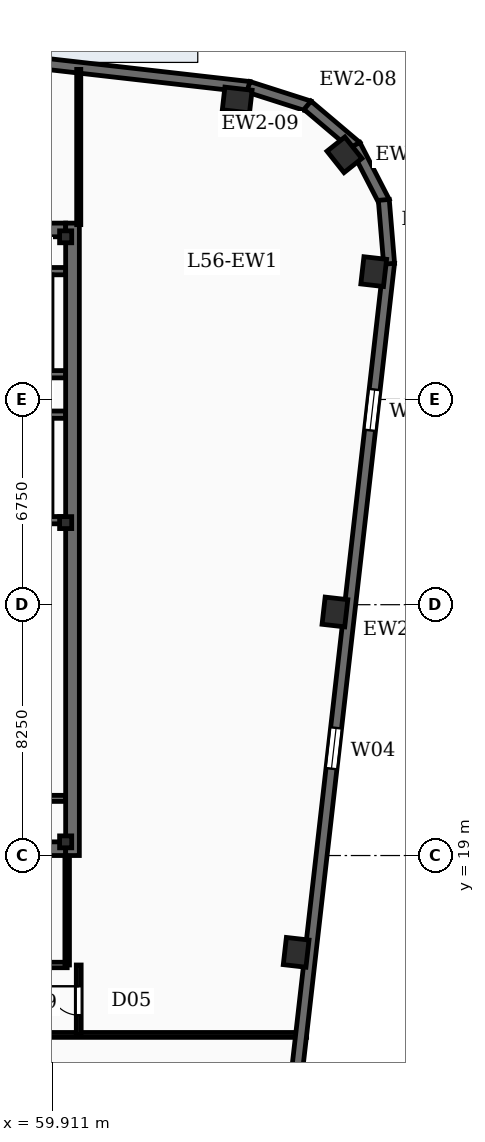
"""IFC4 building model, lengths in metres.
Left out: names, types, materials, properties, quantities, classifications, styles, units other than length and angle.
Written with IfcOpenShell. Run it as: python <this file> out.ifc"""

import sys

from ifc_helpers import new_model, si_unit, direction, frame, frame_2d, origin, origin_2d, place, context, subcontext, project, spatial, rectangle, i_section, extrude, element, fill, save


model = new_model("IFC4")
c1 = context("Model", 3, precision=1e-05, world=origin(), true_north=direction((0.0, 1.0)))
c2 = subcontext(c1, "Body", "Model", "MODEL_VIEW")
j1 = project(units=[si_unit("LENGTHUNIT", "METRE"), si_unit("PLANEANGLEUNIT", "RADIAN")], contexts=[c1])
p1 = place(None, origin())
s1 = spatial("IfcSite", under=j1, at=p1, CompositionType="ELEMENT")
p2 = place(p1, origin())
s2 = spatial("IfcBuilding", under=s1, at=p2, CompositionType="ELEMENT")
p3 = place(p2, frame((0.0, 0.0, 232.2)))
s3 = spatial("IfcBuildingStorey", under=s2, at=p3, CompositionType="ELEMENT", Elevation=232.2)
p4 = place(p3, frame((60.575, 19.0, -0.27), z_axis=(0.0, 0.0, 1.0), x_axis=(0.0, 1.0, 0.0)))
e1 = element("IfcWall", 1, at=p4, inside=s3, PredefinedType="SHEAR", context=c2, shape_type="SweptSolid", body=[
    extrude(rectangle(XDim=20.8, YDim=0.45, at=frame_2d((10.4, 0.0))), origin(), (0.0, 0.0, 1.0), 3.75),
])
for number, where, z_axis, x_axis in (
    (2, (50.55, 19.225, -0.27), (0.0, 0.0, 1.0), (1.0, 0.0, 0.0)),
    (3, (50.55, 39.575, -0.27), (0.0, 0.0, 1.0), (1.0, 0.0, 0.0)),
):
    element("IfcWall", number, at=place(p3, frame(where, z_axis=z_axis, x_axis=x_axis)), inside=s3, PredefinedType="SHEAR", context=c2, shape_type="SweptSolid", body=[
        extrude(rectangle(XDim=9.8, YDim=0.45, at=frame_2d((4.9, 0.0))), origin(), (0.0, 0.0, 1.0), 3.75),
    ])
for number, where, z_axis, x_axis in (
    (4, (60.35, 19.45, -0.27), (0.0, 0.0, 1.0), (1.0, 0.0, 0.0)),
    (5, (60.35, 29.95, -0.27), (0.0, 0.0, 1.0), (1.0, 0.0, 0.0)),
    (6, (60.35, 39.35, -0.27), (0.0, 0.0, 1.0), (1.0, 0.0, 0.0)),
):
    element("IfcColumn", number, at=place(p3, frame(where, z_axis=z_axis, x_axis=x_axis)), inside=s3, PredefinedType="COLUMN", context=c2, shape_type="SweptSolid", body=[
        extrude(i_section(OverallWidth=0.399, OverallDepth=0.393, WebThickness=0.023, FlangeThickness=0.037, FilletRadius=0.02, at=origin_2d()), origin(), (0.0, 0.0, 1.0), 3.75),
    ])
for number, where, z_axis, x_axis in (
    (7, (67.931, 15.816, -0.27), (0.0, 0.0, 1.0), (0.113, 0.994, 0.0)),
    (8, (69.207, 27.01, -0.27), (0.0, 0.0, 1.0), (0.113, 0.994, 0.0)),
    (9, (70.482, 38.205, -0.27), (0.0, 0.0, 1.0), (0.113, 0.994, 0.0)),
    (10, (69.52, 42.047, -0.27), (0.0, 0.0, 1.0), (-0.623, 0.783, 0.0)),
    (11, (65.992, 43.849, -0.27), (0.0, 0.0, 1.0), (0.994, -0.113, 0.0)),
):
    element("IfcColumn", number, at=place(p3, frame(where, z_axis=z_axis, x_axis=x_axis)), inside=s3, PredefinedType="COLUMN", context=c2, shape_type="SweptSolid", body=[
        extrude(rectangle(XDim=0.9, YDim=0.75, at=origin_2d()), origin(), (0.0, 0.0, 1.0), 3.75),
    ])
p5 = place(p3, frame((70.989, 38.499, 0.0), z_axis=(0.0, 0.0, 1.0), x_axis=(-0.113203107947, -0.993571867733, 0.0)))
e12 = element("IfcWall", 12, at=p5, inside=s3, PredefinedType="SOLIDWALL", context=c2, shape_type="SweptSolid", body=[
    extrude(rectangle(XDim=34.5, YDim=0.36, at=frame_2d((17.25, 0.0))), origin(), (0.0, 0.0, 1.0), 3.48),
])
p6 = place(p5, frame((4.2, 0.0, 0.88)))
e13 = element("IfcOpeningElement", 13, at=p6, cuts=e12, PredefinedType="OPENING", context=c2, shape_type="SweptSolid", body=[
    extrude(rectangle(XDim=1.35, YDim=2.2, at=frame_2d((0.675, 1.1))), frame((0.0, 0.19, 0.0), z_axis=(0.0, -1.0, 0.0), x_axis=(1.0, 0.0, 0.0)), (0.0, 0.0, 1.0), 0.38),
])
p7 = place(p5, frame((15.4, 0.0, 0.88)))
e14 = element("IfcOpeningElement", 14, at=p7, cuts=e12, PredefinedType="OPENING", context=c2, shape_type="SweptSolid", body=[
    extrude(rectangle(XDim=1.35, YDim=2.2, at=frame_2d((0.675, 1.1))), frame((0.0, 0.19, 0.0), z_axis=(0.0, -1.0, 0.0), x_axis=(1.0, 0.0, 0.0)), (0.0, 0.0, 1.0), 0.38),
])
p8 = place(p5, frame((26.6, 0.0, 0.88)))
e15 = element("IfcOpeningElement", 15, at=p8, cuts=e12, PredefinedType="OPENING", context=c2, shape_type="SweptSolid", body=[
    extrude(rectangle(XDim=1.35, YDim=2.2, at=frame_2d((0.675, 1.1))), frame((0.0, 0.19, 0.0), z_axis=(0.0, -1.0, 0.0), x_axis=(1.0, 0.0, 0.0)), (0.0, 0.0, 1.0), 0.38),
])
p9 = place(p3, frame((70.814, 40.564, 0.0), z_axis=(0.0, 0.0, 1.0), x_axis=(0.082853678144, -0.996561723135, 0.0)))
e16 = element("IfcWall", 16, at=p9, inside=s3, PredefinedType="SOLIDWALL", context=c2, shape_type="SweptSolid", body=[
    extrude(rectangle(XDim=2.107, YDim=0.36, at=frame_2d((1.053, 0.0))), origin(), (0.0, 0.0, 1.0), 3.48),
])
for number, where, z_axis, x_axis in (
    (17, (69.868, 42.369, 0.0), (0.0, 0.0, 1.0), (0.458, -0.889, 0.0)),
    (18, (68.304, 43.676, 0.0), (0.0, 0.0, 1.0), (0.763, -0.646, 0.0)),
    (19, (66.359, 44.284, 0.0), (0.0, 0.0, 1.0), (0.952, -0.305, 0.0)),
):
    element("IfcWall", number, at=place(p3, frame(where, z_axis=z_axis, x_axis=x_axis)), inside=s3, PredefinedType="SOLIDWALL", context=c2, shape_type="SweptSolid", body=[
        extrude(rectangle(XDim=2.107, YDim=0.36, at=frame_2d((1.054, 0.0))), origin(), (0.0, 0.0, 1.0), 3.48),
    ])
p10 = place(p3, frame((19.894, 49.575, 0.0), z_axis=(0.0, 0.0, 1.0), x_axis=(0.993571439016, -0.113206870688, 0.0)))
e20 = element("IfcWall", 20, at=p10, inside=s3, PredefinedType="SOLIDWALL", context=c2, shape_type="SweptSolid", body=[
    extrude(rectangle(XDim=46.8, YDim=0.36, at=frame_2d((23.4, 0.0))), origin(), (0.0, 0.0, 1.0), 3.48),
])
p11 = place(p10, frame((2.6, 0.0, 0.88)))
e21 = element("IfcOpeningElement", 21, at=p11, cuts=e20, PredefinedType="OPENING", context=c2, shape_type="SweptSolid", body=[
    extrude(rectangle(XDim=1.5, YDim=2.05, at=frame_2d((0.75, 1.025))), frame((0.0, 0.19, 0.0), z_axis=(0.0, -1.0, 0.0), x_axis=(1.0, 0.0, 0.0)), (0.0, 0.0, 1.0), 0.38),
])
p12 = place(p10, frame((29.6, 0.0, 0.88)))
e22 = element("IfcOpeningElement", 22, at=p12, cuts=e20, PredefinedType="OPENING", context=c2, shape_type="SweptSolid", body=[
    extrude(rectangle(XDim=1.5, YDim=2.05, at=frame_2d((0.75, 1.025))), frame((0.0, 0.19, 0.0), z_axis=(0.0, -1.0, 0.0), x_axis=(1.0, 0.0, 0.0)), (0.0, 0.0, 1.0), 0.38),
])
p13 = place(p3, frame((60.35, 30.03, 0.0), z_axis=(0.0, 0.0, 1.0), x_axis=(-1.0, 0.0, 0.0)))
e23 = element("IfcWall", 23, at=p13, inside=s3, PredefinedType="SOLIDWALL", context=c2, shape_type="SweptSolid", body=[
    extrude(rectangle(XDim=9.8, YDim=0.24, at=frame_2d((4.9, 0.0))), origin(), (0.0, 0.0, 1.0), 3.48),
])
p14 = place(p13, frame((7.83, 0.0, 0.0)))
e24 = element("IfcOpeningElement", 24, at=p14, cuts=e23, PredefinedType="OPENING", context=c2, shape_type="SweptSolid", body=[
    extrude(rectangle(XDim=1.1, YDim=2.15, at=frame_2d((0.55, 1.075))), frame((0.0, 0.13, 0.0), z_axis=(0.0, -1.0, 0.0), x_axis=(1.0, 0.0, 0.0)), (0.0, 0.0, 1.0), 0.26),
])
p15 = place(p3, frame((50.55, 33.5, 0.0), z_axis=(0.0, 0.0, 1.0), x_axis=(1.0, 0.0, 0.0)))
e25 = element("IfcWall", 25, at=p15, inside=s3, PredefinedType="SOLIDWALL", context=c2, shape_type="SweptSolid", body=[
    extrude(rectangle(XDim=9.8, YDim=0.24, at=frame_2d((4.9, 0.0))), origin(), (0.0, 0.0, 1.0), 3.48),
])
p16 = place(p3, frame((59.78, 30.15, 0.0), z_axis=(0.0, 0.0, 1.0), x_axis=(0.0, 1.0, 0.0)))
e26 = element("IfcWall", 26, at=p16, inside=s3, PredefinedType="SOLIDWALL", context=c2, shape_type="SweptSolid", body=[
    extrude(rectangle(XDim=3.23, YDim=0.24, at=frame_2d((1.615, 0.0))), origin(), (0.0, 0.0, 1.0), 3.48),
])
p17 = place(p3, frame((60.35, 34.83, 0.0), z_axis=(0.0, 0.0, 1.0), x_axis=(-1.0, 0.0, 0.0)))
e27 = element("IfcWall", 27, at=p17, inside=s3, PredefinedType="SOLIDWALL", context=c2, shape_type="SweptSolid", body=[
    extrude(rectangle(XDim=9.8, YDim=0.24, at=frame_2d((4.9, 0.0))), origin(), (0.0, 0.0, 1.0), 3.48),
])
p18 = place(p17, frame((7.87, 0.0, 0.0)))
e28 = element("IfcOpeningElement", 28, at=p18, cuts=e27, PredefinedType="OPENING", context=c2, shape_type="SweptSolid", body=[
    extrude(rectangle(XDim=1.1, YDim=2.15, at=frame_2d((0.55, 1.075))), frame((0.0, 0.13, 0.0), z_axis=(0.0, -1.0, 0.0), x_axis=(1.0, 0.0, 0.0)), (0.0, 0.0, 1.0), 0.26),
])
p19 = place(p3, frame((50.55, 38.22, 0.0), z_axis=(0.0, 0.0, 1.0), x_axis=(1.0, 0.0, 0.0)))
e29 = element("IfcWall", 29, at=p19, inside=s3, PredefinedType="SOLIDWALL", context=c2, shape_type="SweptSolid", body=[
    extrude(rectangle(XDim=9.8, YDim=0.24, at=frame_2d((4.9, 0.0))), origin(), (0.0, 0.0, 1.0), 3.48),
])
p20 = place(p3, frame((59.78, 34.95, 0.0), z_axis=(0.0, 0.0, 1.0), x_axis=(0.0, 1.0, 0.0)))
e30 = element("IfcWall", 30, at=p20, inside=s3, PredefinedType="SOLIDWALL", context=c2, shape_type="SweptSolid", body=[
    extrude(rectangle(XDim=3.15, YDim=0.24, at=frame_2d((1.575, 0.0))), origin(), (0.0, 0.0, 1.0), 3.48),
])
p21 = place(p3, frame((50.55, 20.88, 0.0), z_axis=(0.0, 0.0, 1.0), x_axis=(1.0, 0.0, 0.0)))
e31 = element("IfcWall", 31, at=p21, inside=s3, PredefinedType="SOLIDWALL", context=c2, shape_type="SweptSolid", body=[
    extrude(rectangle(XDim=9.8, YDim=0.2, at=frame_2d((4.9, 0.0))), origin(), (0.0, 0.0, 1.0), 2.54),
])
p22 = place(p21, frame((1.4, 0.0, 0.0)))
e32 = element("IfcOpeningElement", 32, at=p22, cuts=e31, PredefinedType="OPENING", context=c2, shape_type="SweptSolid", body=[
    extrude(rectangle(XDim=1.05, YDim=2.15, at=frame_2d((0.525, 1.075))), frame((0.0, 0.11, 0.0), z_axis=(0.0, -1.0, 0.0), x_axis=(1.0, 0.0, 0.0)), (0.0, 0.0, 1.0), 0.22),
])
p23 = place(p21, frame((5.5, 0.0, 0.0)))
e33 = element("IfcOpeningElement", 33, at=p23, cuts=e31, PredefinedType="OPENING", context=c2, shape_type="SweptSolid", body=[
    extrude(rectangle(XDim=1.05, YDim=2.15, at=frame_2d((0.525, 1.075))), frame((0.0, 0.11, 0.0), z_axis=(0.0, -1.0, 0.0), x_axis=(1.0, 0.0, 0.0)), (0.0, 0.0, 1.0), 0.22),
])
p24 = place(p3, frame((50.4, 15.4, 0.0), z_axis=(0.0, 0.0, 1.0), x_axis=(1.0, 0.0, 0.0)))
e34 = element("IfcWall", 34, at=p24, inside=s3, PredefinedType="SOLIDWALL", context=c2, shape_type="SweptSolid", body=[
    extrude(rectangle(XDim=10.0, YDim=0.18, at=frame_2d((5.0, 0.0))), origin(), (0.0, 0.0, 1.0), 2.54),
])
p25 = place(p24, frame((0.54, 0.0, 0.0)))
e35 = element("IfcOpeningElement", 35, at=p25, cuts=e34, PredefinedType="OPENING", context=c2, shape_type="SweptSolid", body=[
    extrude(rectangle(XDim=0.92, YDim=2.1, at=frame_2d((0.46, 1.05))), frame((0.0, 0.1, 0.0), z_axis=(0.0, -1.0, 0.0), x_axis=(1.0, 0.0, 0.0)), (0.0, 0.0, 1.0), 0.2),
])
p26 = place(p24, frame((2.54, 0.0, 0.0)))
e36 = element("IfcOpeningElement", 36, at=p26, cuts=e34, PredefinedType="OPENING", context=c2, shape_type="SweptSolid", body=[
    extrude(rectangle(XDim=0.92, YDim=2.1, at=frame_2d((0.46, 1.05))), frame((0.0, 0.1, 0.0), z_axis=(0.0, -1.0, 0.0), x_axis=(1.0, 0.0, 0.0)), (0.0, 0.0, 1.0), 0.2),
])
p27 = place(p24, frame((4.54, 0.0, 0.0)))
e37 = element("IfcOpeningElement", 37, at=p27, cuts=e34, PredefinedType="OPENING", context=c2, shape_type="SweptSolid", body=[
    extrude(rectangle(XDim=0.92, YDim=2.1, at=frame_2d((0.46, 1.05))), frame((0.0, 0.1, 0.0), z_axis=(0.0, -1.0, 0.0), x_axis=(1.0, 0.0, 0.0)), (0.0, 0.0, 1.0), 0.2),
])
p28 = place(p24, frame((6.54, 0.0, 0.0)))
e38 = element("IfcOpeningElement", 38, at=p28, cuts=e34, PredefinedType="OPENING", context=c2, shape_type="SweptSolid", body=[
    extrude(rectangle(XDim=0.92, YDim=2.1, at=frame_2d((0.46, 1.05))), frame((0.0, 0.1, 0.0), z_axis=(0.0, -1.0, 0.0), x_axis=(1.0, 0.0, 0.0)), (0.0, 0.0, 1.0), 0.2),
])
p29 = place(p24, frame((8.57, 0.0, 0.0)))
e39 = element("IfcOpeningElement", 39, at=p29, cuts=e34, PredefinedType="OPENING", context=c2, shape_type="SweptSolid", body=[
    extrude(rectangle(XDim=0.86, YDim=2.05, at=frame_2d((0.43, 1.025))), frame((0.0, 0.1, 0.0), z_axis=(0.0, -1.0, 0.0), x_axis=(1.0, 0.0, 0.0)), (0.0, 0.0, 1.0), 0.2),
])
p30 = place(p3, frame((60.4, 15.4, 0.0), z_axis=(0.0, 0.0, 1.0), x_axis=(0.0, 1.0, 0.0)))
e40 = element("IfcWall", 40, at=p30, inside=s3, PredefinedType="PARTITIONING", context=c2, shape_type="SweptSolid", body=[
    extrude(rectangle(XDim=3.58, YDim=0.15, at=frame_2d((1.79, 0.0))), origin(), (0.0, 0.0, 1.0), 2.54),
])
p31 = place(p3, frame((10.303, 13.1, 0.0), z_axis=(0.0, 0.0, 1.0), x_axis=(1.0, 0.0, 0.0)))
e41 = element("IfcWall", 41, at=p31, inside=s3, PredefinedType="PARTITIONING", context=c2, shape_type="SweptSolid", body=[
    extrude(rectangle(XDim=57.973, YDim=0.16, at=frame_2d((28.986, 0.0))), origin(), (0.0, 0.0, 1.0), 2.54),
])
p32 = place(p31, frame((8.922, 0.0, 0.0)))
e42 = element("IfcOpeningElement", 42, at=p32, cuts=e41, PredefinedType="OPENING", context=c2, shape_type="SweptSolid", body=[
    extrude(rectangle(XDim=0.95, YDim=2.15, at=frame_2d((0.475, 1.075))), frame((0.0, 0.09, 0.0), z_axis=(0.0, -1.0, 0.0), x_axis=(1.0, 0.0, 0.0)), (0.0, 0.0, 1.0), 0.18),
])
p33 = place(p31, frame((17.222, 0.0, 0.0)))
e43 = element("IfcOpeningElement", 43, at=p33, cuts=e41, PredefinedType="OPENING", context=c2, shape_type="SweptSolid", body=[
    extrude(rectangle(XDim=0.95, YDim=2.15, at=frame_2d((0.475, 1.075))), frame((0.0, 0.09, 0.0), z_axis=(0.0, -1.0, 0.0), x_axis=(1.0, 0.0, 0.0)), (0.0, 0.0, 1.0), 0.18),
])
p34 = place(p31, frame((24.222, 0.0, 0.0)))
e44 = element("IfcOpeningElement", 44, at=p34, cuts=e41, PredefinedType="OPENING", context=c2, shape_type="SweptSolid", body=[
    extrude(rectangle(XDim=0.95, YDim=2.15, at=frame_2d((0.475, 1.075))), frame((0.0, 0.09, 0.0), z_axis=(0.0, -1.0, 0.0), x_axis=(1.0, 0.0, 0.0)), (0.0, 0.0, 1.0), 0.18),
])
p35 = place(p31, frame((31.222, 0.0, 0.0)))
e45 = element("IfcOpeningElement", 45, at=p35, cuts=e41, PredefinedType="OPENING", context=c2, shape_type="SweptSolid", body=[
    extrude(rectangle(XDim=0.95, YDim=2.15, at=frame_2d((0.475, 1.075))), frame((0.0, 0.09, 0.0), z_axis=(0.0, -1.0, 0.0), x_axis=(1.0, 0.0, 0.0)), (0.0, 0.0, 1.0), 0.18),
])
p36 = place(p31, frame((37.972, 0.0, 0.0)))
e46 = element("IfcOpeningElement", 46, at=p36, cuts=e41, PredefinedType="OPENING", context=c2, shape_type="SweptSolid", body=[
    extrude(rectangle(XDim=0.95, YDim=2.15, at=frame_2d((0.475, 1.075))), frame((0.0, 0.09, 0.0), z_axis=(0.0, -1.0, 0.0), x_axis=(1.0, 0.0, 0.0)), (0.0, 0.0, 1.0), 0.18),
])
p37 = place(p31, frame((45.222, 0.0, 0.0)))
e47 = element("IfcOpeningElement", 47, at=p37, cuts=e41, PredefinedType="OPENING", context=c2, shape_type="SweptSolid", body=[
    extrude(rectangle(XDim=0.95, YDim=2.15, at=frame_2d((0.475, 1.075))), frame((0.0, 0.09, 0.0), z_axis=(0.0, -1.0, 0.0), x_axis=(1.0, 0.0, 0.0)), (0.0, 0.0, 1.0), 0.18),
])
p38 = place(p3, frame((60.78, 39.75, 0.0), z_axis=(0.0, 0.0, 1.0), x_axis=(0.0, 1.0, 0.0)))
e48 = element("IfcWall", 48, at=p38, inside=s3, PredefinedType="PARTITIONING", context=c2, shape_type="SweptSolid", body=[
    extrude(rectangle(XDim=5.106, YDim=0.135, at=frame_2d((2.553, 0.0))), origin(), (0.0, 0.0, 1.0), 2.54),
])
p39 = place(p3, frame((60.78, 13.1, 0.0), z_axis=(0.0, 0.0, 1.0), x_axis=(0.0, 1.0, 0.0)))
e49 = element("IfcWall", 49, at=p39, inside=s3, PredefinedType="PARTITIONING", context=c2, shape_type="SweptSolid", body=[
    extrude(rectangle(XDim=2.3, YDim=0.16, at=frame_2d((1.15, 0.0))), origin(), (0.0, 0.0, 1.0), 2.54),
])
p40 = place(p39, frame((0.65, 0.0, 0.0)))
e50 = element("IfcOpeningElement", 50, at=p40, cuts=e49, PredefinedType="OPENING", context=c2, shape_type="SweptSolid", body=[
    extrude(rectangle(XDim=0.95, YDim=2.15, at=frame_2d((0.475, 1.075))), frame((0.0, 0.09, 0.0), z_axis=(0.0, -1.0, 0.0), x_axis=(1.0, 0.0, 0.0)), (0.0, 0.0, 1.0), 0.18),
])
p41 = place(p6, origin())
e51 = element("IfcWindow", 51, at=p41, inside=s3, PartitioningType="SINGLE_PANEL", PredefinedType="WINDOW", context=c2, shape_type="SweptSolid", body=[
    extrude(rectangle(XDim=1.35, YDim=2.2, at=frame_2d((0.675, 1.1))), frame((0.0, 0.03, 0.0), z_axis=(0.0, -1.0, 0.0), x_axis=(1.0, 0.0, 0.0)), (0.0, 0.0, 1.0), 0.06),
])
fill(e13, e51)
p42 = place(p7, origin())
e52 = element("IfcWindow", 52, at=p42, inside=s3, PartitioningType="SINGLE_PANEL", PredefinedType="WINDOW", context=c2, shape_type="SweptSolid", body=[
    extrude(rectangle(XDim=1.35, YDim=2.2, at=frame_2d((0.675, 1.1))), frame((0.0, 0.03, 0.0), z_axis=(0.0, -1.0, 0.0), x_axis=(1.0, 0.0, 0.0)), (0.0, 0.0, 1.0), 0.06),
])
fill(e14, e52)
p43 = place(p40, origin())
e53 = element("IfcDoor", 53, at=p43, inside=s3, OperationType="SINGLE_SWING_RIGHT", PredefinedType="DOOR", context=c2, shape_type="SweptSolid", body=[
    extrude(rectangle(XDim=0.95, YDim=2.15, at=frame_2d((0.475, 1.075))), frame((0.0, 0.025, 0.0), z_axis=(0.0, -1.0, 0.0), x_axis=(1.0, 0.0, 0.0)), (0.0, 0.0, 1.0), 0.05),
])
fill(e50, e53)
save(model, sys.argv[1])
